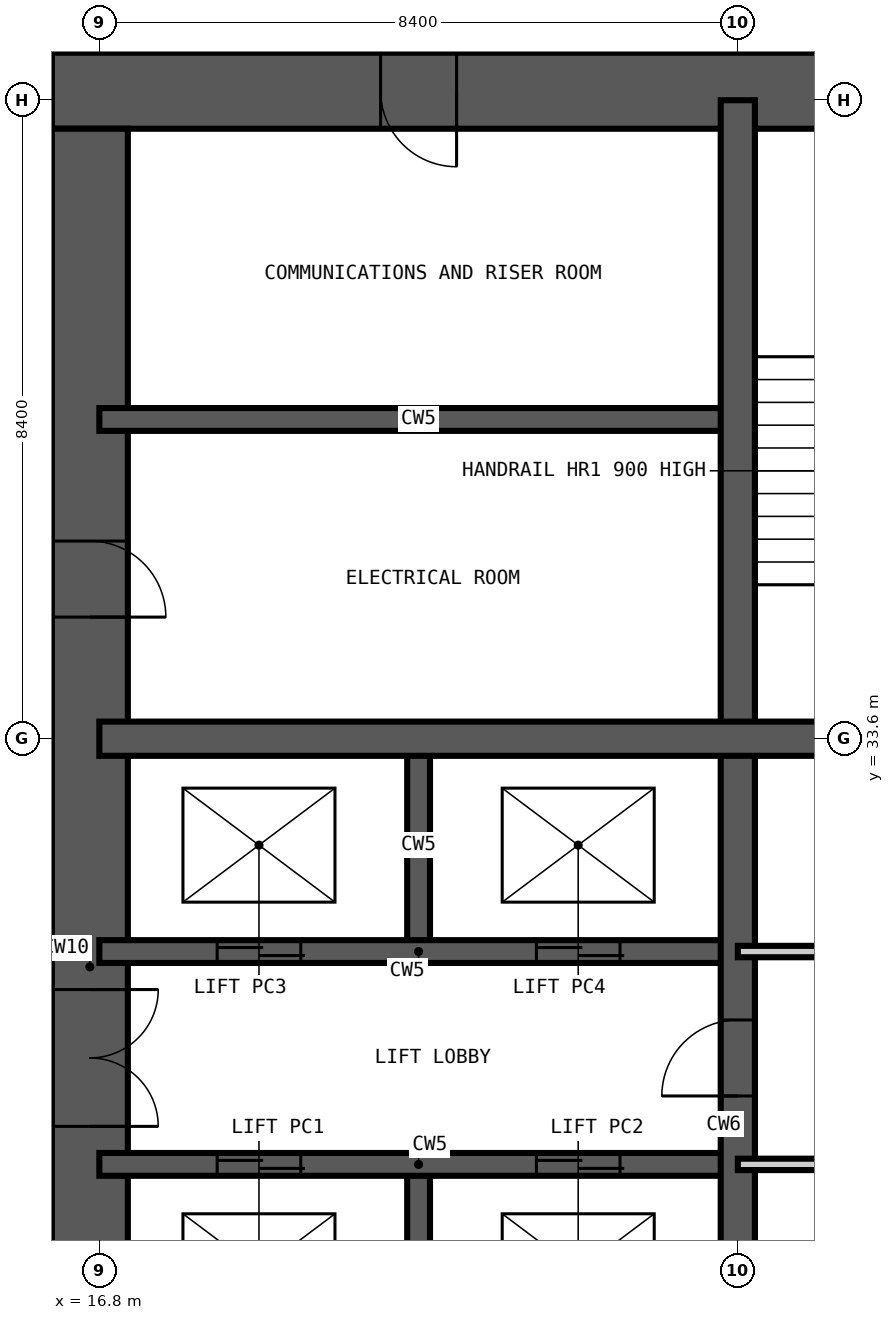
"""IFC4 building model, lengths in metres.
Left out: names, types, materials, properties, quantities, classifications, styles, units other than length and angle.
Written with IfcOpenShell. Run it as: python <this file> out.ifc"""

import sys

from ifc_helpers import new_model, si_unit, direction, frame, frame_2d, origin, place, context, subcontext, project, spatial, rectangle, extrude, element, fill, save


model = new_model("IFC4")
c1 = context("Model", 3, precision=1e-05, world=origin(), true_north=direction((0.0, 1.0)))
c2 = subcontext(c1, "Body", "Model", "MODEL_VIEW")
j1 = project(units=[si_unit("LENGTHUNIT", "METRE"), si_unit("PLANEANGLEUNIT", "RADIAN")], contexts=[c1])
p1 = place(None, origin())
s1 = spatial("IfcSite", under=j1, at=p1, CompositionType="ELEMENT")
p2 = place(p1, origin())
s2 = spatial("IfcBuilding", under=s1, at=p2, CompositionType="ELEMENT")
p3 = place(p2, frame((0.0, 0.0, 118.8)))
s3 = spatial("IfcBuildingStorey", under=s2, at=p3, CompositionType="ELEMENT", Elevation=118.8)
p4 = place(p3, frame((42.625, 42.125, -0.35), z_axis=(0.0, 0.0, 1.0), x_axis=(-1.0, 0.0, 0.0)))
e1 = element("IfcWall", 1, at=p4, inside=s3, PredefinedType="SHEAR", context=c2, shape_type="SweptSolid", body=[
    extrude(rectangle(XDim=26.45, YDim=1.0, at=frame_2d((13.225, 0.0))), origin(), (0.0, 0.0, 1.0), 3.6),
])
p5 = place(p4, frame((21.125, 0.0, 0.35)))
e2 = element("IfcOpeningElement", 2, at=p5, cuts=e1, PredefinedType="OPENING", context=c2, shape_type="SweptSolid", body=[
    extrude(rectangle(XDim=1.0, YDim=2.1, at=frame_2d((0.5, 1.05))), frame((0.0, 0.51, 0.0), z_axis=(0.0, -1.0, 0.0), x_axis=(1.0, 0.0, 0.0)), (0.0, 0.0, 1.0), 1.02),
])
p6 = place(p4, frame((10.525, 0.0, 0.35)))
e3 = element("IfcOpeningElement", 3, at=p6, cuts=e1, PredefinedType="OPENING", context=c2, shape_type="SweptSolid", body=[
    extrude(rectangle(XDim=1.2, YDim=2.2, at=frame_2d((0.6, 1.1))), frame((0.0, 0.51, 0.0), z_axis=(0.0, -1.0, 0.0), x_axis=(1.0, 0.0, 0.0)), (0.0, 0.0, 1.0), 1.02),
])
p7 = place(p3, frame((16.675, 41.625, -0.35), z_axis=(0.0, 0.0, 1.0), x_axis=(0.0, -1.0, 0.0)))
e4 = element("IfcWall", 4, at=p7, inside=s3, PredefinedType="SHEAR", context=c2, shape_type="SweptSolid", body=[
    extrude(rectangle(XDim=24.45, YDim=1.0, at=frame_2d((12.225, 0.0))), origin(), (0.0, 0.0, 1.0), 3.6),
])
p8 = place(p7, frame((11.325, 0.0, 0.35)))
e5 = element("IfcOpeningElement", 5, at=p8, cuts=e4, PredefinedType="OPENING", context=c2, shape_type="SweptSolid", body=[
    extrude(rectangle(XDim=1.8, YDim=2.2, at=frame_2d((0.9, 1.1))), frame((0.0, 0.51, 0.0), z_axis=(0.0, -1.0, 0.0), x_axis=(1.0, 0.0, 0.0)), (0.0, 0.0, 1.0), 1.02),
])
p9 = place(p7, frame((20.125, 0.0, 0.35)))
e6 = element("IfcOpeningElement", 6, at=p9, cuts=e4, PredefinedType="OPENING", context=c2, shape_type="SweptSolid", body=[
    extrude(rectangle(XDim=1.0, YDim=2.1, at=frame_2d((0.5, 1.05))), frame((0.0, 0.51, 0.0), z_axis=(0.0, -1.0, 0.0), x_axis=(1.0, 0.0, 0.0)), (0.0, 0.0, 1.0), 1.02),
])
p10 = place(p7, frame((5.425, 0.0, 0.35)))
e7 = element("IfcOpeningElement", 7, at=p10, cuts=e4, PredefinedType="OPENING", context=c2, shape_type="SweptSolid", body=[
    extrude(rectangle(XDim=1.0, YDim=2.1, at=frame_2d((0.5, 1.05))), frame((0.0, 0.51, 0.0), z_axis=(0.0, -1.0, 0.0), x_axis=(1.0, 0.0, 0.0)), (0.0, 0.0, 1.0), 1.02),
])
p11 = place(p3, frame((21.0, 22.4, -0.35), z_axis=(0.0, 0.0, 1.0), x_axis=(0.0, 1.0, 0.0)))
e8 = element("IfcWall", 8, at=p11, inside=s3, PredefinedType="SHEAR", context=c2, shape_type="SweptSolid", body=[
    extrude(rectangle(XDim=5.6, YDim=0.3, at=frame_2d((2.8, 0.0))), origin(), (0.0, 0.0, 1.0), 3.6),
])
p12 = place(p3, frame((21.0, 30.8, -0.35), z_axis=(0.0, 0.0, 1.0), x_axis=(0.0, 1.0, 0.0)))
e9 = element("IfcWall", 9, at=p12, inside=s3, PredefinedType="SHEAR", context=c2, shape_type="SweptSolid", body=[
    extrude(rectangle(XDim=2.8, YDim=0.3, at=frame_2d((1.4, 0.0))), origin(), (0.0, 0.0, 1.0), 3.6),
])
p13 = place(p3, frame((16.8, 28.0, -0.35), z_axis=(0.0, 0.0, 1.0), x_axis=(1.0, 0.0, 0.0)))
e10 = element("IfcWall", 10, at=p13, inside=s3, PredefinedType="SHEAR", context=c2, shape_type="SweptSolid", body=[
    extrude(rectangle(XDim=8.4, YDim=0.3, at=frame_2d((4.2, 0.0))), origin(), (0.0, 0.0, 1.0), 3.6),
])
p14 = place(p13, frame((1.55, 0.0, 0.35)))
e11 = element("IfcOpeningElement", 11, at=p14, cuts=e10, PredefinedType="OPENING", context=c2, shape_type="SweptSolid", body=[
    extrude(rectangle(XDim=1.1, YDim=2.2, at=frame_2d((0.55, 1.1))), frame((0.0, 0.16, 0.0), z_axis=(0.0, -1.0, 0.0), x_axis=(1.0, 0.0, 0.0)), (0.0, 0.0, 1.0), 0.32),
])
p15 = place(p13, frame((5.75, 0.0, 0.35)))
e12 = element("IfcOpeningElement", 12, at=p15, cuts=e10, PredefinedType="OPENING", context=c2, shape_type="SweptSolid", body=[
    extrude(rectangle(XDim=1.1, YDim=2.2, at=frame_2d((0.55, 1.1))), frame((0.0, 0.16, 0.0), z_axis=(0.0, -1.0, 0.0), x_axis=(1.0, 0.0, 0.0)), (0.0, 0.0, 1.0), 0.32),
])
p16 = place(p3, frame((16.8, 30.8, -0.35), z_axis=(0.0, 0.0, 1.0), x_axis=(1.0, 0.0, 0.0)))
e13 = element("IfcWall", 13, at=p16, inside=s3, PredefinedType="SHEAR", context=c2, shape_type="SweptSolid", body=[
    extrude(rectangle(XDim=8.4, YDim=0.3, at=frame_2d((4.2, 0.0))), origin(), (0.0, 0.0, 1.0), 3.6),
])
p17 = place(p16, frame((1.55, 0.0, 0.35)))
e14 = element("IfcOpeningElement", 14, at=p17, cuts=e13, PredefinedType="OPENING", context=c2, shape_type="SweptSolid", body=[
    extrude(rectangle(XDim=1.1, YDim=2.2, at=frame_2d((0.55, 1.1))), frame((0.0, 0.16, 0.0), z_axis=(0.0, -1.0, 0.0), x_axis=(1.0, 0.0, 0.0)), (0.0, 0.0, 1.0), 0.32),
])
p18 = place(p16, frame((5.75, 0.0, 0.35)))
e15 = element("IfcOpeningElement", 15, at=p18, cuts=e13, PredefinedType="OPENING", context=c2, shape_type="SweptSolid", body=[
    extrude(rectangle(XDim=1.1, YDim=2.2, at=frame_2d((0.55, 1.1))), frame((0.0, 0.16, 0.0), z_axis=(0.0, -1.0, 0.0), x_axis=(1.0, 0.0, 0.0)), (0.0, 0.0, 1.0), 0.32),
])
p19 = place(p3, frame((16.8, 37.8, -0.35), z_axis=(0.0, 0.0, 1.0), x_axis=(1.0, 0.0, 0.0)))
e16 = element("IfcWall", 16, at=p19, inside=s3, PredefinedType="SHEAR", context=c2, shape_type="SweptSolid", body=[
    extrude(rectangle(XDim=8.4, YDim=0.3, at=frame_2d((4.2, 0.0))), origin(), (0.0, 0.0, 1.0), 3.6),
])
p20 = place(p3, frame((25.2, 16.8, -0.35), z_axis=(0.0, 0.0, 1.0), x_axis=(0.0, 1.0, 0.0)))
e17 = element("IfcWall", 17, at=p20, inside=s3, PredefinedType="SHEAR", context=c2, shape_type="SweptSolid", body=[
    extrude(rectangle(XDim=25.2, YDim=0.45, at=frame_2d((12.6, 0.0))), origin(), (0.0, 0.0, 1.0), 3.6),
])
p21 = place(p20, frame((12.1, 0.0, 0.35)))
e18 = element("IfcOpeningElement", 18, at=p21, cuts=e17, PredefinedType="OPENING", context=c2, shape_type="SweptSolid", body=[
    extrude(rectangle(XDim=1.0, YDim=2.1, at=frame_2d((0.5, 1.05))), frame((0.0, 0.235, 0.0), z_axis=(0.0, -1.0, 0.0), x_axis=(1.0, 0.0, 0.0)), (0.0, 0.0, 1.0), 0.47),
])
p22 = place(p3, frame((16.8, 33.6, -0.35), z_axis=(0.0, 0.0, 1.0), x_axis=(1.0, 0.0, 0.0)))
e19 = element("IfcWall", 19, at=p22, inside=s3, PredefinedType="SHEAR", context=c2, shape_type="SweptSolid", body=[
    extrude(rectangle(XDim=25.2, YDim=0.45, at=frame_2d((12.6, 0.0))), origin(), (0.0, 0.0, 1.0), 3.6),
])
p23 = place(p22, frame((22.6, 0.0, 0.35)))
e20 = element("IfcOpeningElement", 20, at=p23, cuts=e19, PredefinedType="OPENING", context=c2, shape_type="SweptSolid", body=[
    extrude(rectangle(XDim=1.0, YDim=2.1, at=frame_2d((0.5, 1.05))), frame((0.0, 0.235, 0.0), z_axis=(0.0, -1.0, 0.0), x_axis=(1.0, 0.0, 0.0)), (0.0, 0.0, 1.0), 0.47),
])
p24 = place(p3, frame((25.2, 28.0, 0.0), z_axis=(0.0, 0.0, 1.0), x_axis=(1.0, 0.0, 0.0)))
e21 = element("IfcWall", 21, at=p24, inside=s3, PredefinedType="PARTITIONING", context=c2, shape_type="SweptSolid", body=[
    extrude(rectangle(XDim=8.4, YDim=0.15, at=frame_2d((4.2, 0.0))), origin(), (0.0, 0.0, 1.0), 3.25),
])
p25 = place(p24, frame((1.6, 0.0, 0.0)))
e22 = element("IfcOpeningElement", 22, at=p25, cuts=e21, PredefinedType="OPENING", context=c2, shape_type="SweptSolid", body=[
    extrude(rectangle(XDim=1.0, YDim=2.1, at=frame_2d((0.5, 1.05))), frame((0.0, 0.085, 0.0), z_axis=(0.0, -1.0, 0.0), x_axis=(1.0, 0.0, 0.0)), (0.0, 0.0, 1.0), 0.17),
])
p26 = place(p24, frame((5.8, 0.0, 0.0)))
e23 = element("IfcOpeningElement", 23, at=p26, cuts=e21, PredefinedType="OPENING", context=c2, shape_type="SweptSolid", body=[
    extrude(rectangle(XDim=1.0, YDim=2.1, at=frame_2d((0.5, 1.05))), frame((0.0, 0.085, 0.0), z_axis=(0.0, -1.0, 0.0), x_axis=(1.0, 0.0, 0.0)), (0.0, 0.0, 1.0), 0.17),
])
p27 = place(p3, frame((25.2, 30.8, 0.0), z_axis=(0.0, 0.0, 1.0), x_axis=(1.0, 0.0, 0.0)))
e24 = element("IfcWall", 24, at=p27, inside=s3, PredefinedType="PARTITIONING", context=c2, shape_type="SweptSolid", body=[
    extrude(rectangle(XDim=8.4, YDim=0.15, at=frame_2d((4.2, 0.0))), origin(), (0.0, 0.0, 1.0), 3.25),
])
p28 = place(p27, frame((3.7, 0.0, 0.0)))
e25 = element("IfcOpeningElement", 25, at=p28, cuts=e24, PredefinedType="OPENING", context=c2, shape_type="SweptSolid", body=[
    extrude(rectangle(XDim=1.0, YDim=2.1, at=frame_2d((0.5, 1.05))), frame((0.0, 0.085, 0.0), z_axis=(0.0, -1.0, 0.0), x_axis=(1.0, 0.0, 0.0)), (0.0, 0.0, 1.0), 0.17),
])
p29 = place(p14, origin())
e26 = element("IfcDoor", 26, at=p29, inside=s3, OperationType="DOUBLE_DOOR_SLIDING", PredefinedType="DOOR", context=c2, shape_type="SweptSolid", body=[
    extrude(rectangle(XDim=1.1, YDim=2.2, at=frame_2d((0.55, 1.1))), frame((0.0, 0.025, 0.0), z_axis=(0.0, -1.0, 0.0), x_axis=(1.0, 0.0, 0.0)), (0.0, 0.0, 1.0), 0.05),
])
fill(e11, e26)
p30 = place(p15, origin())
e27 = element("IfcDoor", 27, at=p30, inside=s3, OperationType="DOUBLE_DOOR_SLIDING", PredefinedType="DOOR", context=c2, shape_type="SweptSolid", body=[
    extrude(rectangle(XDim=1.1, YDim=2.2, at=frame_2d((0.55, 1.1))), frame((0.0, 0.025, 0.0), z_axis=(0.0, -1.0, 0.0), x_axis=(1.0, 0.0, 0.0)), (0.0, 0.0, 1.0), 0.05),
])
fill(e12, e27)
p31 = place(p17, origin())
e28 = element("IfcDoor", 28, at=p31, inside=s3, OperationType="DOUBLE_DOOR_SLIDING", PredefinedType="DOOR", context=c2, shape_type="SweptSolid", body=[
    extrude(rectangle(XDim=1.1, YDim=2.2, at=frame_2d((0.55, 1.1))), frame((0.0, 0.025, 0.0), z_axis=(0.0, -1.0, 0.0), x_axis=(1.0, 0.0, 0.0)), (0.0, 0.0, 1.0), 0.05),
])
fill(e14, e28)
p32 = place(p18, origin())
e29 = element("IfcDoor", 29, at=p32, inside=s3, OperationType="DOUBLE_DOOR_SLIDING", PredefinedType="DOOR", context=c2, shape_type="SweptSolid", body=[
    extrude(rectangle(XDim=1.1, YDim=2.2, at=frame_2d((0.55, 1.1))), frame((0.0, 0.025, 0.0), z_axis=(0.0, -1.0, 0.0), x_axis=(1.0, 0.0, 0.0)), (0.0, 0.0, 1.0), 0.05),
])
fill(e15, e29)
p33 = place(p8, origin())
e30 = element("IfcDoor", 30, at=p33, inside=s3, OperationType="DOUBLE_DOOR_DOUBLE_SWING", PredefinedType="DOOR", context=c2, shape_type="SweptSolid", body=[
    extrude(rectangle(XDim=1.8, YDim=2.2, at=frame_2d((0.9, 1.1))), frame((0.0, 0.025, 0.0), z_axis=(0.0, -1.0, 0.0), x_axis=(1.0, 0.0, 0.0)), (0.0, 0.0, 1.0), 0.05),
])
fill(e5, e30)
p34 = place(p10, origin())
e31 = element("IfcDoor", 31, at=p34, inside=s3, OperationType="SINGLE_SWING_RIGHT", PredefinedType="DOOR", context=c2, shape_type="SweptSolid", body=[
    extrude(rectangle(XDim=1.0, YDim=2.1, at=frame_2d((0.5, 1.05))), frame((0.0, 0.025, 0.0), z_axis=(0.0, -1.0, 0.0), x_axis=(1.0, 0.0, 0.0)), (0.0, 0.0, 1.0), 0.05),
])
fill(e7, e31)
p35 = place(p5, origin())
e32 = element("IfcDoor", 32, at=p35, inside=s3, OperationType="SINGLE_SWING_LEFT", PredefinedType="DOOR", context=c2, shape_type="SweptSolid", body=[
    extrude(rectangle(XDim=1.0, YDim=2.1, at=frame_2d((0.5, 1.05))), frame((0.0, 0.025, 0.0), z_axis=(0.0, -1.0, 0.0), x_axis=(1.0, 0.0, 0.0)), (0.0, 0.0, 1.0), 0.05),
])
fill(e2, e32)
p36 = place(p21, origin())
e33 = element("IfcDoor", 33, at=p36, inside=s3, OperationType="SINGLE_SWING_LEFT", PredefinedType="DOOR", context=c2, shape_type="SweptSolid", body=[
    extrude(rectangle(XDim=1.0, YDim=2.1, at=frame_2d((0.5, 1.05))), frame((0.0, 0.025, 0.0), z_axis=(0.0, -1.0, 0.0), x_axis=(1.0, 0.0, 0.0)), (0.0, 0.0, 1.0), 0.05),
])
fill(e18, e33)
save(model, sys.argv[1])
